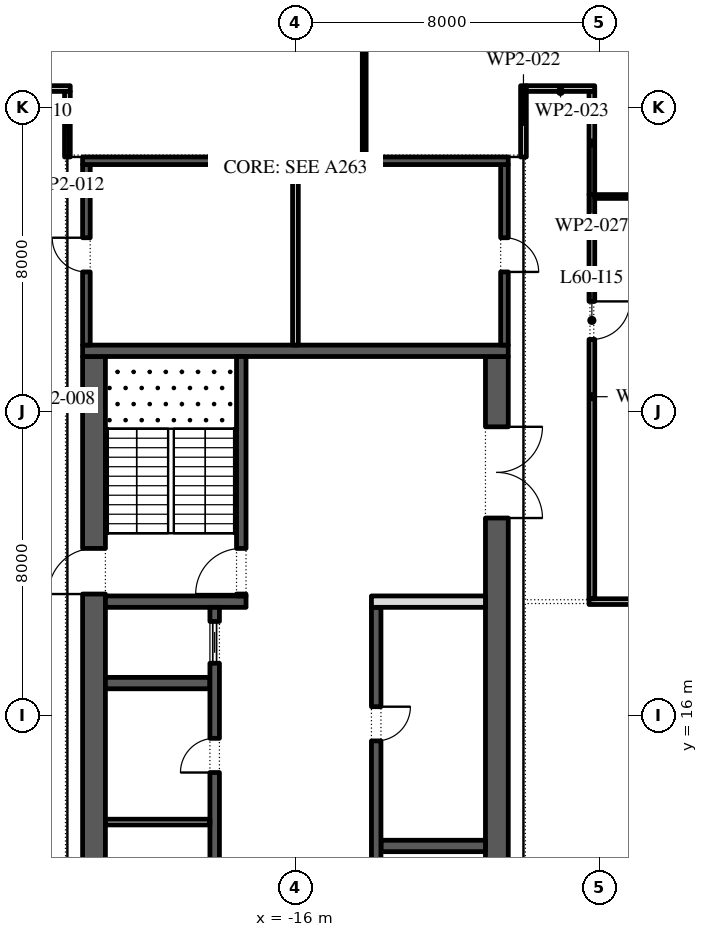
"""IFC4 building model, lengths in metres.
Left out: names, types, materials, properties, quantities, classifications, styles, units other than length and angle.
Written with IfcOpenShell. Run it as: python <this file> out.ifc"""

import sys

from ifc_helpers import new_model, si_unit, direction, frame, frame_2d, origin, place, context, subcontext, project, spatial, rectangle, extrude, element, fill, save


model = new_model("IFC4")
c1 = context("Model", 3, precision=1e-05, world=origin(), true_north=direction((0.0, 1.0)))
c2 = subcontext(c1, "Body", "Model", "MODEL_VIEW")
j1 = project(units=[si_unit("LENGTHUNIT", "METRE"), si_unit("PLANEANGLEUNIT", "RADIAN")], contexts=[c1])
p1 = place(None, origin())
s1 = spatial("IfcSite", under=j1, at=p1, CompositionType="ELEMENT")
p2 = place(p1, origin())
s2 = spatial("IfcBuilding", under=s1, at=p2, CompositionType="ELEMENT")
p3 = place(p2, frame((0.0, 0.0, 276.6)))
s3 = spatial("IfcBuildingStorey", under=s2, at=p3, CompositionType="ELEMENT", Elevation=276.6)
p4 = place(p3, frame((-21.359, 48.678, 0.0), z_axis=(0.0, 0.0, 1.0), x_axis=(-0.224949198343, -0.974370493275, 0.0)))
e1 = element("IfcWall", 1, at=p4, inside=s3, PredefinedType="STANDARD", context=c2, shape_type="SweptSolid", body=[
    extrude(rectangle(XDim=49.5, YDim=0.3, at=frame_2d((24.75, 0.0))), origin(), (0.0, 0.0, 1.0), 4.0),
])
p5 = place(p4, frame((1.157, 0.0, 0.45)))
e2 = element("IfcOpeningElement", 2, at=p5, cuts=e1, PredefinedType="OPENING", context=c2, shape_type="SweptSolid", body=[
    extrude(rectangle(XDim=4.5, YDim=3.05, at=frame_2d((2.25, 1.525))), frame((0.0, 0.16, 0.0), z_axis=(0.0, -1.0, 0.0), x_axis=(1.0, 0.0, 0.0)), (0.0, 0.0, 1.0), 0.32),
])
p6 = place(p4, frame((9.171, 0.0, 0.0)))
e3 = element("IfcOpeningElement", 3, at=p6, cuts=e1, PredefinedType="OPENING", context=c2, shape_type="SweptSolid", body=[
    extrude(rectangle(XDim=2.4, YDim=3.5, at=frame_2d((1.2, 1.75))), frame((0.0, 0.16, 0.0), z_axis=(0.0, -1.0, 0.0), x_axis=(1.0, 0.0, 0.0)), (0.0, 0.0, 1.0), 0.32),
])
p7 = place(p4, frame((15.236, 0.0, 0.45)))
e4 = element("IfcOpeningElement", 4, at=p7, cuts=e1, PredefinedType="OPENING", context=c2, shape_type="SweptSolid", body=[
    extrude(rectangle(XDim=4.5, YDim=3.05, at=frame_2d((2.25, 1.525))), frame((0.0, 0.16, 0.0), z_axis=(0.0, -1.0, 0.0), x_axis=(1.0, 0.0, 0.0)), (0.0, 0.0, 1.0), 0.32),
])
p8 = place(p4, frame((22.35, 0.0, 0.45)))
e5 = element("IfcOpeningElement", 5, at=p8, cuts=e1, PredefinedType="OPENING", context=c2, shape_type="SweptSolid", body=[
    extrude(rectangle(XDim=4.5, YDim=3.05, at=frame_2d((2.25, 1.525))), frame((0.0, 0.16, 0.0), z_axis=(0.0, -1.0, 0.0), x_axis=(1.0, 0.0, 0.0)), (0.0, 0.0, 1.0), 0.32),
])
p9 = place(p4, frame((29.464, 0.0, 0.45)))
e6 = element("IfcOpeningElement", 6, at=p9, cuts=e1, PredefinedType="OPENING", context=c2, shape_type="SweptSolid", body=[
    extrude(rectangle(XDim=4.5, YDim=3.05, at=frame_2d((2.25, 1.525))), frame((0.0, 0.16, 0.0), z_axis=(0.0, -1.0, 0.0), x_axis=(1.0, 0.0, 0.0)), (0.0, 0.0, 1.0), 0.32),
])
p10 = place(p4, frame((37.628, 0.0, 0.0)))
e7 = element("IfcOpeningElement", 7, at=p10, cuts=e1, PredefinedType="OPENING", context=c2, shape_type="SweptSolid", body=[
    extrude(rectangle(XDim=2.4, YDim=3.325, at=frame_2d((1.2, 1.663))), frame((0.0, 0.16, 0.0), z_axis=(0.0, -1.0, 0.0), x_axis=(1.0, 0.0, 0.0)), (0.0, 0.0, 1.0), 0.32),
])
p11 = place(p4, frame((43.693, 0.0, 0.45)))
e8 = element("IfcOpeningElement", 8, at=p11, cuts=e1, PredefinedType="OPENING", context=c2, shape_type="SweptSolid", body=[
    extrude(rectangle(XDim=4.5, YDim=2.825, at=frame_2d((2.25, 1.413))), frame((0.0, 0.16, 0.0), z_axis=(0.0, -1.0, 0.0), x_axis=(1.0, 0.0, 0.0)), (0.0, 0.0, 1.0), 0.32),
])
p12 = place(p3, frame((-21.3, -2.45, 0.0), z_axis=(0.0, 0.0, 1.0), x_axis=(0.0, 1.0, 0.0)))
e9 = element("IfcWall", 9, at=p12, inside=s3, PredefinedType="SHEAR", context=c2, shape_type="SweptSolid", body=[
    extrude(rectangle(XDim=27.9, YDim=0.6, at=frame_2d((13.95, 0.0))), origin(), (0.0, 0.0, 1.0), 4.0),
])
p13 = place(p12, frame((5.05, 0.0, 0.0)))
e10 = element("IfcOpeningElement", 10, at=p13, cuts=e9, PredefinedType="OPENING", context=c2, shape_type="SweptSolid", body=[
    extrude(rectangle(XDim=1.2, YDim=2.1, at=frame_2d((0.6, 1.05))), frame((0.0, 0.31, 0.0), z_axis=(0.0, -1.0, 0.0), x_axis=(1.0, 0.0, 0.0)), (0.0, 0.0, 1.0), 0.62),
])
p14 = place(p12, frame((21.65, 0.0, 0.0)))
e11 = element("IfcOpeningElement", 11, at=p14, cuts=e9, PredefinedType="OPENING", context=c2, shape_type="SweptSolid", body=[
    extrude(rectangle(XDim=1.2, YDim=2.1, at=frame_2d((0.6, 1.05))), frame((0.0, 0.31, 0.0), z_axis=(0.0, -1.0, 0.0), x_axis=(1.0, 0.0, 0.0)), (0.0, 0.0, 1.0), 0.62),
])
p15 = place(p3, frame((-10.7, -2.45, 0.0), z_axis=(0.0, 0.0, 1.0), x_axis=(0.0, 1.0, 0.0)))
e12 = element("IfcWall", 12, at=p15, inside=s3, PredefinedType="SHEAR", context=c2, shape_type="SweptSolid", body=[
    extrude(rectangle(XDim=27.9, YDim=0.6, at=frame_2d((13.95, 0.0))), origin(), (0.0, 0.0, 1.0), 4.0),
])
p16 = place(p15, frame((23.65, 0.0, 0.0)))
e13 = element("IfcOpeningElement", 13, at=p16, cuts=e12, PredefinedType="OPENING", context=c2, shape_type="SweptSolid", body=[
    extrude(rectangle(XDim=2.4, YDim=2.1, at=frame_2d((1.2, 1.05))), frame((0.0, 0.31, 0.0), z_axis=(0.0, -1.0, 0.0), x_axis=(1.0, 0.0, 0.0)), (0.0, 0.0, 1.0), 0.62),
])
p17 = place(p15, frame((1.387, 0.0, 0.0)))
e14 = element("IfcOpeningElement", 14, at=p17, cuts=e12, PredefinedType="OPENING", context=c2, shape_type="SweptSolid", body=[
    extrude(rectangle(XDim=0.9, YDim=2.1, at=frame_2d((0.45, 1.05))), frame((0.0, 0.31, 0.0), z_axis=(0.0, -1.0, 0.0), x_axis=(1.0, 0.0, 0.0)), (0.0, 0.0, 1.0), 0.62),
])
p18 = place(p15, frame((4.562, 0.0, 0.0)))
e15 = element("IfcOpeningElement", 15, at=p18, cuts=e12, PredefinedType="OPENING", context=c2, shape_type="SweptSolid", body=[
    extrude(rectangle(XDim=1.0, YDim=2.1, at=frame_2d((0.5, 1.05))), frame((0.0, 0.31, 0.0), z_axis=(0.0, -1.0, 0.0), x_axis=(1.0, 0.0, 0.0)), (0.0, 0.0, 1.0), 0.62),
])
p19 = place(p3, frame((-21.6, 25.6, 0.0), z_axis=(0.0, 0.0, 1.0), x_axis=(1.0, 0.0, 0.0)))
e16 = element("IfcWall", 16, at=p19, inside=s3, PredefinedType="SHEAR", context=c2, shape_type="SweptSolid", body=[
    extrude(rectangle(XDim=11.2, YDim=0.3, at=frame_2d((5.6, 0.0))), origin(), (0.0, 0.0, 1.0), 4.0),
])
p20 = place(p3, frame((-21.0, 19.0, 0.0), z_axis=(0.0, 0.0, 1.0), x_axis=(1.0, 0.0, 0.0)))
e17 = element("IfcWall", 17, at=p20, inside=s3, PredefinedType="SHEAR", context=c2, shape_type="SweptSolid", body=[
    extrude(rectangle(XDim=3.7, YDim=0.3, at=frame_2d((1.85, 0.0))), origin(), (0.0, 0.0, 1.0), 4.0),
])
p21 = place(p3, frame((-17.425, 19.15, 0.0), z_axis=(0.0, 0.0, 1.0), x_axis=(0.0, 1.0, 0.0)))
e18 = element("IfcWall", 18, at=p21, inside=s3, PredefinedType="SHEAR", context=c2, shape_type="SweptSolid", body=[
    extrude(rectangle(XDim=6.3, YDim=0.25, at=frame_2d((3.15, 0.0))), origin(), (0.0, 0.0, 1.0), 4.0),
])
p22 = place(p21, frame((0.05, 0.0, 0.0)))
e19 = element("IfcOpeningElement", 19, at=p22, cuts=e18, PredefinedType="OPENING", context=c2, shape_type="SweptSolid", body=[
    extrude(rectangle(XDim=1.2, YDim=2.1, at=frame_2d((0.6, 1.05))), frame((0.0, 0.135, 0.0), z_axis=(0.0, -1.0, 0.0), x_axis=(1.0, 0.0, 0.0)), (0.0, 0.0, 1.0), 0.27),
])
p23 = place(p3, frame((-21.0, 16.857, 0.0), z_axis=(0.0, 0.0, 1.0), x_axis=(1.0, 0.0, 0.0)))
e20 = element("IfcWall", 20, at=p23, inside=s3, PredefinedType="SHEAR", context=c2, shape_type="SweptSolid", body=[
    extrude(rectangle(XDim=2.75, YDim=0.3, at=frame_2d((1.375, 0.0))), origin(), (0.0, 0.0, 1.0), 4.0),
])
p24 = place(p3, frame((-18.125, 4.15, 0.0), z_axis=(0.0, 0.0, 1.0), x_axis=(0.0, 1.0, 0.0)))
e21 = element("IfcWall", 21, at=p24, inside=s3, PredefinedType="SHEAR", context=c2, shape_type="SweptSolid", body=[
    extrude(rectangle(XDim=14.7, YDim=0.25, at=frame_2d((7.35, 0.0))), origin(), (0.0, 0.0, 1.0), 4.0),
])
p25 = place(p24, frame((3.446, 0.0, 0.0)))
e22 = element("IfcOpeningElement", 22, at=p25, cuts=e21, PredefinedType="OPENING", context=c2, shape_type="SweptSolid", body=[
    extrude(rectangle(XDim=0.9, YDim=2.1, at=frame_2d((0.45, 1.05))), frame((0.0, 0.135, 0.0), z_axis=(0.0, -1.0, 0.0), x_axis=(1.0, 0.0, 0.0)), (0.0, 0.0, 1.0), 0.27),
])
p26 = place(p24, frame((6.9, 0.0, 0.0)))
e23 = element("IfcOpeningElement", 23, at=p26, cuts=e21, PredefinedType="OPENING", context=c2, shape_type="SweptSolid", body=[
    extrude(rectangle(XDim=0.9, YDim=2.1, at=frame_2d((0.45, 1.05))), frame((0.0, 0.135, 0.0), z_axis=(0.0, -1.0, 0.0), x_axis=(1.0, 0.0, 0.0)), (0.0, 0.0, 1.0), 0.27),
])
p27 = place(p24, frame((10.354, 0.0, 0.0)))
e24 = element("IfcOpeningElement", 24, at=p27, cuts=e21, PredefinedType="OPENING", context=c2, shape_type="SweptSolid", body=[
    extrude(rectangle(XDim=0.9, YDim=2.1, at=frame_2d((0.45, 1.05))), frame((0.0, 0.135, 0.0), z_axis=(0.0, -1.0, 0.0), x_axis=(1.0, 0.0, 0.0)), (0.0, 0.0, 1.0), 0.27),
])
p28 = place(p24, frame((0.371, 0.0, 0.0)))
e25 = element("IfcOpeningElement", 25, at=p28, cuts=e21, PredefinedType="OPENING", context=c2, shape_type="SweptSolid", body=[
    extrude(rectangle(XDim=1.1, YDim=2.1, at=frame_2d((0.55, 1.05))), frame((0.0, 0.135, 0.0), z_axis=(0.0, -1.0, 0.0), x_axis=(1.0, 0.0, 0.0)), (0.0, 0.0, 1.0), 0.27),
])
p29 = place(p24, frame((13.229, 0.0, 0.0)))
e26 = element("IfcOpeningElement", 26, at=p29, cuts=e21, PredefinedType="OPENING", context=c2, shape_type="SweptSolid", body=[
    extrude(rectangle(XDim=1.1, YDim=2.1, at=frame_2d((0.55, 1.05))), frame((0.0, 0.135, 0.0), z_axis=(0.0, -1.0, 0.0), x_axis=(1.0, 0.0, 0.0)), (0.0, 0.0, 1.0), 0.27),
])
p30 = place(p3, frame((-21.0, 13.2, 0.0), z_axis=(0.0, 0.0, 1.0), x_axis=(1.0, 0.0, 0.0)))
e27 = element("IfcWall", 27, at=p30, inside=s3, PredefinedType="PARTITIONING", context=c2, shape_type="SweptSolid", body=[
    extrude(rectangle(XDim=2.75, YDim=0.15, at=frame_2d((1.375, 0.0))), origin(), (0.0, 0.0, 1.0), 4.0),
])
p31 = place(p3, frame((-13.75, 12.571, 0.0), z_axis=(0.0, 0.0, 1.0), x_axis=(1.0, 0.0, 0.0)))
e28 = element("IfcWall", 28, at=p31, inside=s3, PredefinedType="SHEAR", context=c2, shape_type="SweptSolid", body=[
    extrude(rectangle(XDim=2.75, YDim=0.3, at=frame_2d((1.375, 0.0))), origin(), (0.0, 0.0, 1.0), 4.0),
])
p32 = place(p3, frame((-13.875, -2.45, 0.0), z_axis=(0.0, 0.0, 1.0), x_axis=(0.0, 1.0, 0.0)))
e29 = element("IfcWall", 29, at=p32, inside=s3, PredefinedType="SHEAR", context=c2, shape_type="SweptSolid", body=[
    extrude(rectangle(XDim=21.3, YDim=0.25, at=frame_2d((10.65, 0.0))), origin(), (0.0, 0.0, 1.0), 4.0),
])
p33 = place(p32, frame((17.786, 0.0, 0.0)))
e30 = element("IfcOpeningElement", 30, at=p33, cuts=e29, PredefinedType="OPENING", context=c2, shape_type="SweptSolid", body=[
    extrude(rectangle(XDim=0.9, YDim=2.1, at=frame_2d((0.45, 1.05))), frame((0.0, 0.135, 0.0), z_axis=(0.0, -1.0, 0.0), x_axis=(1.0, 0.0, 0.0)), (0.0, 0.0, 1.0), 0.27),
])
p34 = place(p32, frame((6.971, 0.0, 0.0)))
e31 = element("IfcOpeningElement", 31, at=p34, cuts=e29, PredefinedType="OPENING", context=c2, shape_type="SweptSolid", body=[
    extrude(rectangle(XDim=1.1, YDim=2.1, at=frame_2d((0.55, 1.05))), frame((0.0, 0.135, 0.0), z_axis=(0.0, -1.0, 0.0), x_axis=(1.0, 0.0, 0.0)), (0.0, 0.0, 1.0), 0.27),
])
p35 = place(p32, frame((9.114, 0.0, 0.0)))
e32 = element("IfcOpeningElement", 32, at=p35, cuts=e29, PredefinedType="OPENING", context=c2, shape_type="SweptSolid", body=[
    extrude(rectangle(XDim=1.1, YDim=2.1, at=frame_2d((0.55, 1.05))), frame((0.0, 0.135, 0.0), z_axis=(0.0, -1.0, 0.0), x_axis=(1.0, 0.0, 0.0)), (0.0, 0.0, 1.0), 0.27),
])
p36 = place(p32, frame((11.257, 0.0, 0.0)))
e33 = element("IfcOpeningElement", 33, at=p36, cuts=e29, PredefinedType="OPENING", context=c2, shape_type="SweptSolid", body=[
    extrude(rectangle(XDim=1.1, YDim=2.1, at=frame_2d((0.55, 1.05))), frame((0.0, 0.135, 0.0), z_axis=(0.0, -1.0, 0.0), x_axis=(1.0, 0.0, 0.0)), (0.0, 0.0, 1.0), 0.27),
])
p37 = place(p32, frame((13.4, 0.0, 0.0)))
e34 = element("IfcOpeningElement", 34, at=p37, cuts=e29, PredefinedType="OPENING", context=c2, shape_type="SweptSolid", body=[
    extrude(rectangle(XDim=1.1, YDim=2.1, at=frame_2d((0.55, 1.05))), frame((0.0, 0.135, 0.0), z_axis=(0.0, -1.0, 0.0), x_axis=(1.0, 0.0, 0.0)), (0.0, 0.0, 1.0), 0.27),
])
p38 = place(p3, frame((-14.0, 19.0, 0.0), z_axis=(0.0, 0.0, 1.0), x_axis=(1.0, 0.0, 0.0)))
e35 = element("IfcWall", 35, at=p38, inside=s3, PredefinedType="PARTITIONING", context=c2, shape_type="SweptSolid", body=[
    extrude(rectangle(XDim=3.0, YDim=0.3, at=frame_2d((1.5, 0.0))), origin(), (0.0, 0.0, 1.0), 4.0),
])
p39 = place(p3, frame((-21.5, 25.75, 0.0), z_axis=(0.0, 0.0, 1.0), x_axis=(0.0, 1.0, 0.0)))
e36 = element("IfcWall", 36, at=p39, inside=s3, PredefinedType="SHEAR", context=c2, shape_type="SweptSolid", body=[
    extrude(rectangle(XDim=4.75, YDim=0.2, at=frame_2d((2.375, 0.0))), origin(), (0.0, 0.0, 1.0), 4.0),
])
p40 = place(p39, frame((1.925, 0.0, 0.0)))
e37 = element("IfcOpeningElement", 37, at=p40, cuts=e36, PredefinedType="OPENING", context=c2, shape_type="SweptSolid", body=[
    extrude(rectangle(XDim=0.9, YDim=2.1, at=frame_2d((0.45, 1.05))), frame((0.0, 0.11, 0.0), z_axis=(0.0, -1.0, 0.0), x_axis=(1.0, 0.0, 0.0)), (0.0, 0.0, 1.0), 0.22),
])
p41 = place(p3, frame((-10.5, 25.75, 0.0), z_axis=(0.0, 0.0, 1.0), x_axis=(0.0, 1.0, 0.0)))
e38 = element("IfcWall", 38, at=p41, inside=s3, PredefinedType="SHEAR", context=c2, shape_type="SweptSolid", body=[
    extrude(rectangle(XDim=4.75, YDim=0.2, at=frame_2d((2.375, 0.0))), origin(), (0.0, 0.0, 1.0), 4.0),
])
p42 = place(p41, frame((1.925, 0.0, 0.0)))
e39 = element("IfcOpeningElement", 39, at=p42, cuts=e38, PredefinedType="OPENING", context=c2, shape_type="SweptSolid", body=[
    extrude(rectangle(XDim=0.9, YDim=2.1, at=frame_2d((0.45, 1.05))), frame((0.0, 0.11, 0.0), z_axis=(0.0, -1.0, 0.0), x_axis=(1.0, 0.0, 0.0)), (0.0, 0.0, 1.0), 0.22),
])
p43 = place(p3, frame((-21.6, 30.6, 0.0), z_axis=(0.0, 0.0, 1.0), x_axis=(1.0, 0.0, 0.0)))
e40 = element("IfcWall", 40, at=p43, inside=s3, PredefinedType="SHEAR", context=c2, shape_type="SweptSolid", body=[
    extrude(rectangle(XDim=11.2, YDim=0.2, at=frame_2d((5.6, 0.0))), origin(), (0.0, 0.0, 1.0), 4.0),
])
p44 = place(p3, frame((-16.0, 25.75, 0.0), z_axis=(0.0, 0.0, 1.0), x_axis=(0.0, 1.0, 0.0)))
e41 = element("IfcWall", 41, at=p44, inside=s3, PredefinedType="PARTITIONING", context=c2, shape_type="SweptSolid", body=[
    extrude(rectangle(XDim=4.75, YDim=0.15, at=frame_2d((2.375, 0.0))), origin(), (0.0, 0.0, 1.0), 4.0),
])
p45 = place(p3, frame((-23.8, 32.5, 0.0), z_axis=(0.0, 0.0, 1.0), x_axis=(1.0, 0.0, 0.0)))
e42 = element("IfcWall", 42, at=p45, inside=s3, PredefinedType="PARTITIONING", context=c2, shape_type="SweptSolid", body=[
    extrude(rectangle(XDim=1.875, YDim=0.15, at=frame_2d((0.938, 0.0))), origin(), (0.0, 0.0, 1.0), 4.0),
])
p46 = place(p3, frame((-22.0, 32.425, 0.0), z_axis=(0.0, 0.0, 1.0), x_axis=(0.0, -1.0, 0.0)))
e43 = element("IfcWall", 43, at=p46, inside=s3, PredefinedType="PARTITIONING", context=c2, shape_type="SweptSolid", body=[
    extrude(rectangle(XDim=1.725, YDim=0.15, at=frame_2d((0.863, 0.0))), origin(), (0.0, 0.0, 1.0), 4.0),
])
p47 = place(p3, frame((-14.19, 30.7, 0.0), z_axis=(0.0, 0.0, 1.0), x_axis=(0.0, 1.0, 0.0)))
e44 = element("IfcWall", 44, at=p47, inside=s3, PredefinedType="PARTITIONING", context=c2, shape_type="SweptSolid", body=[
    extrude(rectangle(XDim=5.85, YDim=0.1, at=frame_2d((2.925, 0.0))), origin(), (0.0, 0.0, 1.0), 4.0),
])
p48 = place(p47, frame((3.7, 0.0, 0.0)))
e45 = element("IfcOpeningElement", 45, at=p48, cuts=e44, PredefinedType="OPENING", context=c2, shape_type="SweptSolid", body=[
    extrude(rectangle(XDim=0.9, YDim=2.1, at=frame_2d((0.45, 1.05))), frame((0.0, 0.06, 0.0), z_axis=(0.0, -1.0, 0.0), x_axis=(1.0, 0.0, 0.0)), (0.0, 0.0, 1.0), 0.12),
])
p49 = place(p3, frame((-10.0, 30.7, 0.0), z_axis=(0.0, 0.0, 1.0), x_axis=(0.0, 1.0, 0.0)))
e46 = element("IfcWall", 46, at=p49, inside=s3, PredefinedType="PARTITIONING", context=c2, shape_type="SweptSolid", body=[
    extrude(rectangle(XDim=1.875, YDim=0.15, at=frame_2d((0.938, 0.0))), origin(), (0.0, 0.0, 1.0), 4.0),
])
p50 = place(p3, frame((-9.925, 32.5, 0.0), z_axis=(0.0, 0.0, 1.0), x_axis=(1.0, 0.0, 0.0)))
e47 = element("IfcWall", 47, at=p50, inside=s3, PredefinedType="PARTITIONING", context=c2, shape_type="SweptSolid", body=[
    extrude(rectangle(XDim=1.8, YDim=0.15, at=frame_2d((0.9, 0.0))), origin(), (0.0, 0.0, 1.0), 4.0),
])
p51 = place(p3, frame((-8.275, 19.0, 0.0), z_axis=(0.0, 0.0, 1.0), x_axis=(1.0, 0.0, 0.0)))
e48 = element("IfcWall", 48, at=p51, inside=s3, PredefinedType="PARTITIONING", context=c2, shape_type="SweptSolid", body=[
    extrude(rectangle(XDim=7.36, YDim=0.15, at=frame_2d((3.68, 0.0))), origin(), (0.0, 0.0, 1.0), 4.0),
])
p52 = place(p3, frame((-8.2, 29.71, 0.0), z_axis=(0.0, 0.0, 1.0), x_axis=(0.0, -1.0, 0.0)))
e49 = element("IfcWall", 49, at=p52, inside=s3, PredefinedType="PARTITIONING", context=c2, shape_type="SweptSolid", body=[
    extrude(rectangle(XDim=10.635, YDim=0.15, at=frame_2d((5.317, 0.0))), origin(), (0.0, 0.0, 1.0), 4.0),
])
p53 = place(p52, frame((2.81, 0.0, 0.0)))
e50 = element("IfcOpeningElement", 50, at=p53, cuts=e49, PredefinedType="OPENING", context=c2, shape_type="SweptSolid", body=[
    extrude(rectangle(XDim=1.0, YDim=2.1, at=frame_2d((0.5, 1.05))), frame((0.0, 0.085, 0.0), z_axis=(0.0, -1.0, 0.0), x_axis=(1.0, 0.0, 0.0)), (0.0, 0.0, 1.0), 0.17),
])
p54 = place(p3, frame((-8.125, 29.66, 0.0), z_axis=(0.0, 0.0, 1.0), x_axis=(1.0, 0.0, 0.0)))
e51 = element("IfcWall", 51, at=p54, inside=s3, PredefinedType="PARTITIONING", context=c2, shape_type="SweptSolid", body=[
    extrude(rectangle(XDim=7.21, YDim=0.1, at=frame_2d((3.605, 0.0))), origin(), (0.0, 0.0, 1.0), 4.0),
])
p55 = place(p3, frame((-8.2, 32.425, 0.0), z_axis=(0.0, 0.0, 1.0), x_axis=(0.0, -1.0, 0.0)))
e52 = element("IfcWall", 52, at=p55, inside=s3, PredefinedType="PARTITIONING", context=c2, shape_type="SweptSolid", body=[
    extrude(rectangle(XDim=2.715, YDim=0.15, at=frame_2d((1.357, 0.0))), origin(), (0.0, 0.0, 1.0), 4.0),
])
p56 = place(p27, origin())
e53 = element("IfcDoor", 53, at=p56, inside=s3, OperationType="SINGLE_SWING_RIGHT", PredefinedType="DOOR", context=c2, shape_type="SweptSolid", body=[
    extrude(rectangle(XDim=0.9, YDim=2.1, at=frame_2d((0.45, 1.05))), frame((0.0, 0.125, 0.0), z_axis=(0.0, -1.0, 0.0), x_axis=(1.0, 0.0, 0.0)), (0.0, 0.0, 1.0), 0.05),
])
fill(e24, e53)
p57 = place(p29, origin())
e54 = element("IfcDoor", 54, at=p57, inside=s3, OperationType="SLIDING_TO_LEFT", PredefinedType="DOOR", context=c2, shape_type="SweptSolid", body=[
    extrude(rectangle(XDim=1.1, YDim=2.1, at=frame_2d((0.55, 1.05))), frame((0.0, 0.025, 0.0), z_axis=(0.0, -1.0, 0.0), x_axis=(1.0, 0.0, 0.0)), (0.0, 0.0, 1.0), 0.05),
])
fill(e26, e54)
p58 = place(p33, frame((0.9, -0.2, 0.0), z_axis=(0.0, 0.0, 1.0), x_axis=(-1.0, 0.0, 0.0)))
e55 = element("IfcDoor", 55, at=p58, inside=s3, OperationType="SINGLE_SWING_RIGHT", PredefinedType="DOOR", context=c2, shape_type="SweptSolid", body=[
    extrude(rectangle(XDim=0.9, YDim=2.1, at=frame_2d((0.45, 1.05))), frame((0.0, -0.075, 0.0), z_axis=(0.0, -1.0, 0.0), x_axis=(1.0, 0.0, 0.0)), (0.0, 0.0, 1.0), 0.05),
])
fill(e30, e55)
p59 = place(p16, frame((2.4, 0.0, 0.0), z_axis=(0.0, 0.0, 1.0), x_axis=(-1.0, 0.0, 0.0)))
e56 = element("IfcDoor", 56, at=p59, inside=s3, OperationType="DOUBLE_DOOR_SINGLE_SWING", PredefinedType="DOOR", context=c2, shape_type="SweptSolid", body=[
    extrude(rectangle(XDim=2.4, YDim=2.1, at=frame_2d((1.2, 1.05))), frame((0.0, 0.025, 0.0), z_axis=(0.0, -1.0, 0.0), x_axis=(1.0, 0.0, 0.0)), (0.0, 0.0, 1.0), 0.05),
])
fill(e13, e56)
p60 = place(p22, origin())
e57 = element("IfcDoor", 57, at=p60, inside=s3, OperationType="SINGLE_SWING_RIGHT", PredefinedType="DOOR", context=c2, shape_type="SweptSolid", body=[
    extrude(rectangle(XDim=1.2, YDim=2.1, at=frame_2d((0.6, 1.05))), frame((0.0, 0.025, 0.0), z_axis=(0.0, -1.0, 0.0), x_axis=(1.0, 0.0, 0.0)), (0.0, 0.0, 1.0), 0.05),
])
fill(e19, e57)
p61 = place(p14, origin())
e58 = element("IfcDoor", 58, at=p61, inside=s3, OperationType="SINGLE_SWING_RIGHT", PredefinedType="DOOR", context=c2, shape_type="SweptSolid", body=[
    extrude(rectangle(XDim=1.2, YDim=2.1, at=frame_2d((0.6, 1.05))), frame((0.0, 0.025, 0.0), z_axis=(0.0, -1.0, 0.0), x_axis=(1.0, 0.0, 0.0)), (0.0, 0.0, 1.0), 0.05),
])
fill(e11, e58)
p62 = place(p40, origin())
e59 = element("IfcDoor", 59, at=p62, inside=s3, OperationType="SINGLE_SWING_LEFT", PredefinedType="DOOR", context=c2, shape_type="SweptSolid", body=[
    extrude(rectangle(XDim=0.9, YDim=2.1, at=frame_2d((0.45, 1.05))), frame((0.0, -0.05, 0.0), z_axis=(0.0, -1.0, 0.0), x_axis=(1.0, 0.0, 0.0)), (0.0, 0.0, 1.0), 0.05),
])
fill(e37, e59)
p63 = place(p42, frame((0.9, 0.15, 0.0), z_axis=(0.0, 0.0, 1.0), x_axis=(-1.0, 0.0, 0.0)))
e60 = element("IfcDoor", 60, at=p63, inside=s3, OperationType="SINGLE_SWING_LEFT", PredefinedType="DOOR", context=c2, shape_type="SweptSolid", body=[
    extrude(rectangle(XDim=0.9, YDim=2.1, at=frame_2d((0.45, 1.05))), frame((0.0, 0.1, 0.0), z_axis=(0.0, -1.0, 0.0), x_axis=(1.0, 0.0, 0.0)), (0.0, 0.0, 1.0), 0.05),
])
fill(e39, e60)
p64 = place(p53, origin())
e61 = element("IfcDoor", 61, at=p64, inside=s3, OperationType="SINGLE_SWING_RIGHT", PredefinedType="DOOR", context=c2, shape_type="SweptSolid", body=[
    extrude(rectangle(XDim=1.0, YDim=2.1, at=frame_2d((0.5, 1.05))), frame((0.0, 0.025, 0.0), z_axis=(0.0, -1.0, 0.0), x_axis=(1.0, 0.0, 0.0)), (0.0, 0.0, 1.0), 0.05),
])
fill(e50, e61)
save(model, sys.argv[1])
